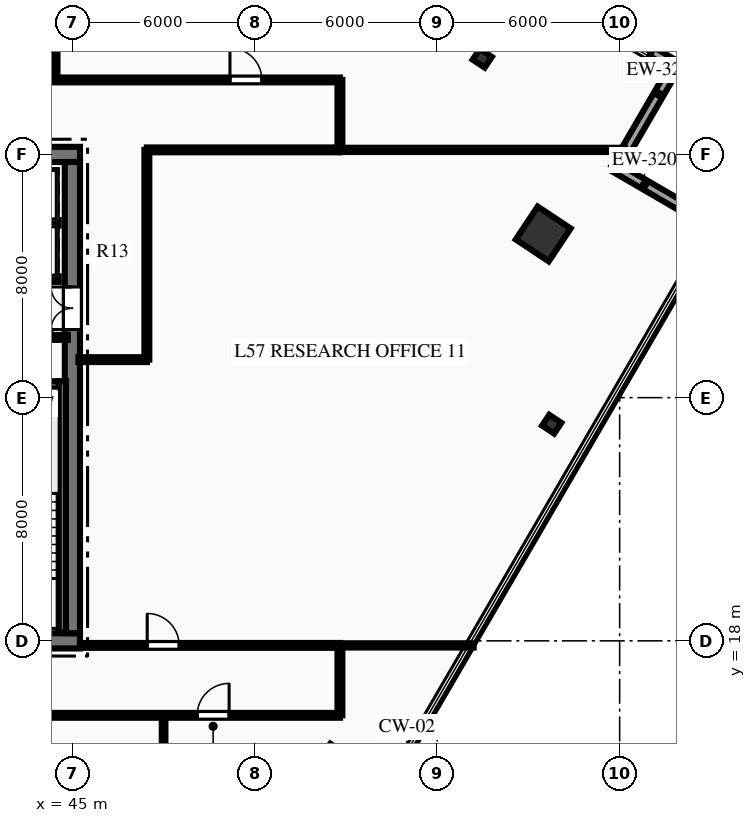
"""IFC4 building model, lengths in metres.
Left out: names, types, materials, properties, quantities, classifications, styles, units other than length and angle.
Written with IfcOpenShell. Run it as: python <this file> out.ifc"""

import sys

from ifc_helpers import new_model, si_unit, direction, frame, frame_2d, origin, origin_2d, place, context, subcontext, project, spatial, rectangle, hollow_rectangle, i_section, extrude, element, fill, save


model = new_model("IFC4")
c1 = context("Model", 3, precision=1e-05, world=origin(), true_north=direction((0.0, 1.0)))
c2 = subcontext(c1, "Body", "Model", "MODEL_VIEW")
j1 = project(units=[si_unit("LENGTHUNIT", "METRE"), si_unit("PLANEANGLEUNIT", "RADIAN")], contexts=[c1])
p1 = place(None, origin())
s1 = spatial("IfcSite", under=j1, at=p1, CompositionType="ELEMENT")
p2 = place(p1, origin())
s2 = spatial("IfcBuilding", under=s1, at=p2, CompositionType="ELEMENT")
p3 = place(p2, frame((0.0, 0.0, 228.45)))
s3 = spatial("IfcBuildingStorey", under=s2, at=p3, CompositionType="ELEMENT", Elevation=228.45)
p4 = place(p3, frame((26.75, 18.0, 0.0), z_axis=(0.0, 0.0, 1.0), x_axis=(1.0, 0.0, 0.0)))
e1 = element("IfcWall", 1, at=p4, inside=s3, PredefinedType="SHEAR", context=c2, shape_type="SweptSolid", body=[
    extrude(rectangle(XDim=18.5, YDim=0.5, at=frame_2d((9.25, 0.0))), origin(), (0.0, 0.0, 1.0), 3.75),
])
p5 = place(p4, frame((7.35, 0.0, 0.0)))
e2 = element("IfcOpeningElement", 2, at=p5, cuts=e1, PredefinedType="OPENING", context=c2, shape_type="SweptSolid", body=[
    extrude(rectangle(XDim=1.1, YDim=2.15, at=frame_2d((0.55, 1.075))), frame((0.0, 0.26, 0.0), z_axis=(0.0, -1.0, 0.0), x_axis=(1.0, 0.0, 0.0)), (0.0, 0.0, 1.0), 0.52),
])
p6 = place(p4, frame((10.05, 0.0, 0.0)))
e3 = element("IfcOpeningElement", 3, at=p6, cuts=e1, PredefinedType="OPENING", context=c2, shape_type="SweptSolid", body=[
    extrude(rectangle(XDim=1.1, YDim=2.15, at=frame_2d((0.55, 1.075))), frame((0.0, 0.26, 0.0), z_axis=(0.0, -1.0, 0.0), x_axis=(1.0, 0.0, 0.0)), (0.0, 0.0, 1.0), 0.52),
])
p7 = place(p3, frame((26.75, 34.0, 0.0), z_axis=(0.0, 0.0, 1.0), x_axis=(1.0, 0.0, 0.0)))
e4 = element("IfcWall", 4, at=p7, inside=s3, PredefinedType="SHEAR", context=c2, shape_type="SweptSolid", body=[
    extrude(rectangle(XDim=18.5, YDim=0.5, at=frame_2d((9.25, 0.0))), origin(), (0.0, 0.0, 1.0), 3.75),
])
p8 = place(p7, frame((13.935, 0.0, 0.0)))
e5 = element("IfcOpeningElement", 5, at=p8, cuts=e4, PredefinedType="OPENING", context=c2, shape_type="SweptSolid", body=[
    extrude(rectangle(XDim=1.1, YDim=2.15, at=frame_2d((0.55, 1.075))), frame((0.0, 0.26, 0.0), z_axis=(0.0, -1.0, 0.0), x_axis=(1.0, 0.0, 0.0)), (0.0, 0.0, 1.0), 0.52),
])
p9 = place(p7, frame((16.185, 0.0, 0.0)))
e6 = element("IfcOpeningElement", 6, at=p9, cuts=e4, PredefinedType="OPENING", context=c2, shape_type="SweptSolid", body=[
    extrude(rectangle(XDim=1.1, YDim=2.15, at=frame_2d((0.55, 1.075))), frame((0.0, 0.26, 0.0), z_axis=(0.0, -1.0, 0.0), x_axis=(1.0, 0.0, 0.0)), (0.0, 0.0, 1.0), 0.52),
])
p10 = place(p3, frame((45.0, 18.25, 0.0), z_axis=(0.0, 0.0, 1.0), x_axis=(0.0, 1.0, 0.0)))
e7 = element("IfcWall", 7, at=p10, inside=s3, PredefinedType="SHEAR", context=c2, shape_type="SweptSolid", body=[
    extrude(rectangle(XDim=15.5, YDim=0.5, at=frame_2d((7.75, 0.0))), origin(), (0.0, 0.0, 1.0), 3.75),
])
p11 = place(p10, frame((9.99, 0.0, 0.0)))
e8 = element("IfcOpeningElement", 8, at=p11, cuts=e7, PredefinedType="OPENING", context=c2, shape_type="SweptSolid", body=[
    extrude(rectangle(XDim=1.4, YDim=2.2, at=frame_2d((0.7, 1.1))), frame((0.0, 0.26, 0.0), z_axis=(0.0, -1.0, 0.0), x_axis=(1.0, 0.0, 0.0)), (0.0, 0.0, 1.0), 0.52),
])
p12 = place(p3, frame((40.81, 26.42, 0.0), z_axis=(0.0, 0.0, 1.0), x_axis=(1.0, 0.0, 0.0)))
e9 = element("IfcWall", 9, at=p12, inside=s3, PredefinedType="SHEAR", context=c2, shape_type="SweptSolid", body=[
    extrude(rectangle(XDim=3.98, YDim=0.24, at=frame_2d((1.99, 0.0))), origin(), (0.0, 0.0, 1.0), 3.75),
])
p13 = place(p3, frame((44.67, 18.28, 0.0), z_axis=(0.0, 0.0, 1.0), x_axis=(0.0, 1.0, 0.0)))
e10 = element("IfcWall", 10, at=p13, inside=s3, PredefinedType="SHEAR", context=c2, shape_type="SweptSolid", body=[
    extrude(rectangle(XDim=8.26, YDim=0.24, at=frame_2d((4.13, 0.0))), origin(), (0.0, 0.0, 1.0), 3.75),
])
p14 = place(p3, frame((60.486, 31.384, 0.0), z_axis=(0.0, 0.0, 1.0), x_axis=(0.554118199338, 0.832437998389, 0.0)))
e11 = element("IfcColumn", 11, at=p14, inside=s3, PredefinedType="COLUMN", context=c2, shape_type="SweptSolid", body=[
    extrude(hollow_rectangle(XDim=1.3, YDim=1.3, WallThickness=0.06, at=origin_2d()), origin(), (0.0, 0.0, 1.0), 3.75),
])
for number, where, z_axis, x_axis in (
    (12, (60.766, 25.126, 0.0), (0.0, 0.0, 1.0), (0.554, 0.832, 0.0)),
    (13, (58.481, 37.164, 0.0), (0.0, 0.0, 1.0), (0.554, 0.832, 0.0)),
):
    element("IfcColumn", number, at=place(p3, frame(where, z_axis=z_axis, x_axis=x_axis)), inside=s3, PredefinedType="COLUMN", context=c2, shape_type="SweptSolid", body=[
        extrude(i_section(OverallWidth=0.424, OverallDepth=0.474, WebThickness=0.048, FlangeThickness=0.077, at=origin_2d()), origin(), (0.0, 0.0, 1.0), 3.75),
    ])
p15 = place(p3, frame((62.874, 33.558, 0.0), z_axis=(0.0, 0.0, 1.0), x_axis=(0.86427115238, -0.503026217174, 0.0)))
e14 = element("IfcWall", 14, at=p15, inside=s3, PredefinedType="STANDARD", context=c2, shape_type="SweptSolid", body=[
    extrude(rectangle(XDim=3.9, YDim=0.32, at=frame_2d((1.95, 0.0))), origin(), (0.0, 0.0, 1.0), 3.47),
])
p16 = place(p3, frame((64.836, 36.928, 0.0), z_axis=(0.0, 0.0, 1.0), x_axis=(-0.503053432331, -0.864255311942, 0.0)))
e15 = element("IfcWall", 15, at=p16, inside=s3, PredefinedType="STANDARD", context=c2, shape_type="SweptSolid", body=[
    extrude(rectangle(XDim=3.9, YDim=0.32, at=frame_2d((1.95, 0.0))), origin(), (0.0, 0.0, 1.0), 3.47),
])
p17 = place(p3, frame((64.058, 37.381, 0.0), z_axis=(0.0, 0.0, 1.0), x_axis=(0.86430974307, -0.502959906984, 0.0)))
e16 = element("IfcWall", 16, at=p17, inside=s3, PredefinedType="STANDARD", context=c2, shape_type="SweptSolid", body=[
    extrude(rectangle(XDim=0.9, YDim=0.32, at=frame_2d((0.45, 0.0))), origin(), (0.0, 0.0, 1.0), 3.47),
])
p18 = place(p3, frame((40.8, 27.98, 0.0), z_axis=(0.0, 0.0, 1.0), x_axis=(1.0, 0.0, 0.0)))
e17 = element("IfcWall", 17, at=p18, inside=s3, PredefinedType="PARTITIONING", context=c2, shape_type="SweptSolid", body=[
    extrude(rectangle(XDim=4.05, YDim=0.16, at=frame_2d((2.025, 0.0))), origin(), (0.0, 0.0, 1.0), 3.47),
])
p19 = place(p18, frame((0.77, 0.0, 0.0)))
e18 = element("IfcOpeningElement", 18, at=p19, cuts=e17, PredefinedType="OPENING", context=c2, shape_type="SweptSolid", body=[
    extrude(rectangle(XDim=0.9, YDim=2.15, at=frame_2d((0.45, 1.075))), frame((0.0, 0.09, 0.0), z_axis=(0.0, -1.0, 0.0), x_axis=(1.0, 0.0, 0.0)), (0.0, 0.0, 1.0), 0.18),
])
p20 = place(p18, frame((2.68, 0.0, 0.0)))
e19 = element("IfcOpeningElement", 19, at=p20, cuts=e17, PredefinedType="OPENING", context=c2, shape_type="SweptSolid", body=[
    extrude(rectangle(XDim=0.9, YDim=2.15, at=frame_2d((0.45, 1.075))), frame((0.0, 0.09, 0.0), z_axis=(0.0, -1.0, 0.0), x_axis=(1.0, 0.0, 0.0)), (0.0, 0.0, 1.0), 0.18),
])
p21 = place(p3, frame((40.12, 29.9, 0.0), z_axis=(0.0, 0.0, 1.0), x_axis=(1.0, 0.0, 0.0)))
e20 = element("IfcWall", 20, at=p21, inside=s3, PredefinedType="PARTITIONING", context=c2, shape_type="SweptSolid", body=[
    extrude(rectangle(XDim=4.43, YDim=0.18, at=frame_2d((2.215, 0.0))), origin(), (0.0, 0.0, 1.0), 3.47),
])
p22 = place(p21, frame((0.565, 0.0, 0.0)))
e21 = element("IfcOpeningElement", 21, at=p22, cuts=e20, PredefinedType="OPENING", context=c2, shape_type="SweptSolid", body=[
    extrude(rectangle(XDim=1.1, YDim=2.15, at=frame_2d((0.55, 1.075))), frame((0.0, 0.1, 0.0), z_axis=(0.0, -1.0, 0.0), x_axis=(1.0, 0.0, 0.0)), (0.0, 0.0, 1.0), 0.2),
])
p23 = place(p21, frame((2.815, 0.0, 0.0)))
e22 = element("IfcOpeningElement", 22, at=p23, cuts=e20, PredefinedType="OPENING", context=c2, shape_type="SweptSolid", body=[
    extrude(rectangle(XDim=1.1, YDim=2.15, at=frame_2d((0.55, 1.075))), frame((0.0, 0.1, 0.0), z_axis=(0.0, -1.0, 0.0), x_axis=(1.0, 0.0, 0.0)), (0.0, 0.0, 1.0), 0.2),
])
p24 = place(p3, frame((40.12, 31.75, 0.0), z_axis=(0.0, 0.0, 1.0), x_axis=(1.0, 0.0, 0.0)))
e23 = element("IfcWall", 23, at=p24, inside=s3, PredefinedType="PARTITIONING", context=c2, shape_type="SweptSolid", body=[
    extrude(rectangle(XDim=4.43, YDim=0.18, at=frame_2d((2.215, 0.0))), origin(), (0.0, 0.0, 1.0), 3.47),
])
p25 = place(p3, frame((18.2, 15.55, 0.0), z_axis=(0.0, 0.0, 1.0), x_axis=(1.0, 0.0, 0.0)))
e24 = element("IfcWall", 24, at=p25, inside=s3, PredefinedType="PARTITIONING", context=c2, shape_type="SweptSolid", body=[
    extrude(rectangle(XDim=35.6, YDim=0.16, at=frame_2d((17.8, 0.0))), origin(), (0.0, 0.0, 1.0), 3.008),
])
p26 = place(p25, frame((3.587, 0.0, 0.0)))
e25 = element("IfcOpeningElement", 25, at=p26, cuts=e24, PredefinedType="OPENING", context=c2, shape_type="SweptSolid", body=[
    extrude(rectangle(XDim=1.05, YDim=2.15, at=frame_2d((0.525, 1.075))), frame((0.0, 0.09, 0.0), z_axis=(0.0, -1.0, 0.0), x_axis=(1.0, 0.0, 0.0)), (0.0, 0.0, 1.0), 0.18),
])
p27 = place(p25, frame((16.775, 0.0, 0.0)))
e26 = element("IfcOpeningElement", 26, at=p27, cuts=e24, PredefinedType="OPENING", context=c2, shape_type="SweptSolid", body=[
    extrude(rectangle(XDim=1.05, YDim=2.15, at=frame_2d((0.525, 1.075))), frame((0.0, 0.09, 0.0), z_axis=(0.0, -1.0, 0.0), x_axis=(1.0, 0.0, 0.0)), (0.0, 0.0, 1.0), 0.18),
])
p28 = place(p25, frame((24.055, 0.0, 0.0)))
e27 = element("IfcOpeningElement", 27, at=p28, cuts=e24, PredefinedType="OPENING", context=c2, shape_type="SweptSolid", body=[
    extrude(rectangle(XDim=1.05, YDim=2.15, at=frame_2d((0.525, 1.075))), frame((0.0, 0.09, 0.0), z_axis=(0.0, -1.0, 0.0), x_axis=(1.0, 0.0, 0.0)), (0.0, 0.0, 1.0), 0.18),
])
p29 = place(p25, frame((30.905, 0.0, 0.0)))
e28 = element("IfcOpeningElement", 28, at=p29, cuts=e24, PredefinedType="OPENING", context=c2, shape_type="SweptSolid", body=[
    extrude(rectangle(XDim=1.05, YDim=2.15, at=frame_2d((0.525, 1.075))), frame((0.0, 0.09, 0.0), z_axis=(0.0, -1.0, 0.0), x_axis=(1.0, 0.0, 0.0)), (0.0, 0.0, 1.0), 0.18),
])
p30 = place(p3, frame((45.25, 17.85, 0.0), z_axis=(0.0, 0.0, 1.0), x_axis=(1.0, 0.0, 0.0)))
e29 = element("IfcWall", 29, at=p30, inside=s3, PredefinedType="PARTITIONING", context=c2, shape_type="SweptSolid", body=[
    extrude(rectangle(XDim=8.55, YDim=0.16, at=frame_2d((4.275, 0.0))), origin(), (0.0, 0.0, 1.0), 3.47),
])
p31 = place(p30, frame((2.211, 0.0, 0.0)))
e30 = element("IfcOpeningElement", 30, at=p31, cuts=e29, PredefinedType="OPENING", context=c2, shape_type="SweptSolid", body=[
    extrude(rectangle(XDim=1.05, YDim=2.15, at=frame_2d((0.525, 1.075))), frame((0.0, 0.09, 0.0), z_axis=(0.0, -1.0, 0.0), x_axis=(1.0, 0.0, 0.0)), (0.0, 0.0, 1.0), 0.18),
])
p32 = place(p3, frame((18.2, 36.45, 0.0), z_axis=(0.0, 0.0, 1.0), x_axis=(1.0, 0.0, 0.0)))
e31 = element("IfcWall", 31, at=p32, inside=s3, PredefinedType="PARTITIONING", context=c2, shape_type="SweptSolid", body=[
    extrude(rectangle(XDim=35.6, YDim=0.16, at=frame_2d((17.8, 0.0))), origin(), (0.0, 0.0, 1.0), 2.849),
])
p33 = place(p32, frame((20.05, 0.0, 0.0)))
e32 = element("IfcOpeningElement", 32, at=p33, cuts=e31, PredefinedType="OPENING", context=c2, shape_type="SweptSolid", body=[
    extrude(rectangle(XDim=0.9, YDim=2.15, at=frame_2d((0.45, 1.075))), frame((0.0, 0.09, 0.0), z_axis=(0.0, -1.0, 0.0), x_axis=(1.0, 0.0, 0.0)), (0.0, 0.0, 1.0), 0.18),
])
p34 = place(p32, frame((22.35, 0.0, 0.0)))
e33 = element("IfcOpeningElement", 33, at=p34, cuts=e31, PredefinedType="OPENING", context=c2, shape_type="SweptSolid", body=[
    extrude(rectangle(XDim=0.9, YDim=2.15, at=frame_2d((0.45, 1.075))), frame((0.0, 0.09, 0.0), z_axis=(0.0, -1.0, 0.0), x_axis=(1.0, 0.0, 0.0)), (0.0, 0.0, 1.0), 0.18),
])
p35 = place(p32, frame((24.6, 0.0, 0.0)))
e34 = element("IfcOpeningElement", 34, at=p35, cuts=e31, PredefinedType="OPENING", context=c2, shape_type="SweptSolid", body=[
    extrude(rectangle(XDim=1.0, YDim=2.15, at=frame_2d((0.5, 1.075))), frame((0.0, 0.09, 0.0), z_axis=(0.0, -1.0, 0.0), x_axis=(1.0, 0.0, 0.0)), (0.0, 0.0, 1.0), 0.18),
])
p36 = place(p32, frame((4.325, 0.0, 0.0)))
e35 = element("IfcOpeningElement", 35, at=p36, cuts=e31, PredefinedType="OPENING", context=c2, shape_type="SweptSolid", body=[
    extrude(rectangle(XDim=1.05, YDim=2.15, at=frame_2d((0.525, 1.075))), frame((0.0, 0.09, 0.0), z_axis=(0.0, -1.0, 0.0), x_axis=(1.0, 0.0, 0.0)), (0.0, 0.0, 1.0), 0.18),
])
p37 = place(p32, frame((11.155, 0.0, 0.0)))
e36 = element("IfcOpeningElement", 36, at=p37, cuts=e31, PredefinedType="OPENING", context=c2, shape_type="SweptSolid", body=[
    extrude(rectangle(XDim=1.05, YDim=2.15, at=frame_2d((0.525, 1.075))), frame((0.0, 0.09, 0.0), z_axis=(0.0, -1.0, 0.0), x_axis=(1.0, 0.0, 0.0)), (0.0, 0.0, 1.0), 0.18),
])
p38 = place(p32, frame((31.983, 0.0, 0.0)))
e37 = element("IfcOpeningElement", 37, at=p38, cuts=e31, PredefinedType="OPENING", context=c2, shape_type="SweptSolid", body=[
    extrude(rectangle(XDim=1.05, YDim=2.15, at=frame_2d((0.525, 1.075))), frame((0.0, 0.09, 0.0), z_axis=(0.0, -1.0, 0.0), x_axis=(1.0, 0.0, 0.0)), (0.0, 0.0, 1.0), 0.18),
])
p39 = place(p3, frame((47.45, 34.15, 0.0), z_axis=(0.0, 0.0, 1.0), x_axis=(1.0, 0.0, 0.0)))
e38 = element("IfcWall", 38, at=p39, inside=s3, PredefinedType="PARTITIONING", context=c2, shape_type="SweptSolid", body=[
    extrude(rectangle(XDim=6.35, YDim=0.16, at=frame_2d((3.175, 0.0))), origin(), (0.0, 0.0, 1.0), 3.47),
])
p40 = place(p3, frame((47.45, 27.25, 0.0), z_axis=(0.0, 0.0, 1.0), x_axis=(0.0, 1.0, 0.0)))
e39 = element("IfcWall", 39, at=p40, inside=s3, PredefinedType="PARTITIONING", context=c2, shape_type="SweptSolid", body=[
    extrude(rectangle(XDim=6.9, YDim=0.16, at=frame_2d((3.45, 0.0))), origin(), (0.0, 0.0, 1.0), 3.47),
])
p41 = place(p3, frame((45.2, 27.25, 0.0), z_axis=(0.0, 0.0, 1.0), x_axis=(1.0, 0.0, 0.0)))
e40 = element("IfcWall", 40, at=p41, inside=s3, PredefinedType="PARTITIONING", context=c2, shape_type="SweptSolid", body=[
    extrude(rectangle(XDim=2.25, YDim=0.16, at=frame_2d((1.125, 0.0))), origin(), (0.0, 0.0, 1.0), 3.47),
])
for number, where, z_axis, x_axis in (
    (41, (53.8, 15.55, 0.0), (0.0, 0.0, 1.0), (0.0, 1.0, 0.0)),
    (42, (53.8, 34.15, 0.0), (0.0, 0.0, 1.0), (0.0, 1.0, 0.0)),
):
    element("IfcWall", number, at=place(p3, frame(where, z_axis=z_axis, x_axis=x_axis)), inside=s3, PredefinedType="PARTITIONING", context=c2, shape_type="SweptSolid", body=[
        extrude(rectangle(XDim=2.3, YDim=0.16, at=frame_2d((1.15, 0.0))), origin(), (0.0, 0.0, 1.0), 3.47),
    ])
p42 = place(p3, frame((44.45, 36.45, 0.0), z_axis=(0.0, 0.0, 1.0), x_axis=(0.0, 1.0, 0.0)))
e43 = element("IfcWall", 43, at=p42, inside=s3, PredefinedType="PARTITIONING", context=c2, shape_type="SweptSolid", body=[
    extrude(rectangle(XDim=3.9, YDim=0.12, at=frame_2d((1.95, 0.0))), origin(), (0.0, 0.0, 1.0), 3.47),
])
p43 = place(p3, frame((53.8, 17.85, 0.0), z_axis=(0.0, 0.0, 1.0), x_axis=(1.0, 0.0, 0.0)))
e44 = element("IfcWall", 44, at=p43, inside=s3, PredefinedType="PARTITIONING", context=c2, shape_type="SweptSolid", body=[
    extrude(rectangle(XDim=4.398, YDim=0.14, at=frame_2d((2.199, 0.0))), origin(), (0.0, 0.0, 1.0), 3.47),
])
p44 = place(p3, frame((53.8, 34.15, 0.0), z_axis=(0.0, 0.0, 1.0), x_axis=(1.0, 0.0, 0.0)))
e45 = element("IfcWall", 45, at=p44, inside=s3, PredefinedType="PARTITIONING", context=c2, shape_type="SweptSolid", body=[
    extrude(rectangle(XDim=9.373, YDim=0.14, at=frame_2d((4.686, 0.0))), origin(), (0.0, 0.0, 1.0), 3.47),
])
p45 = place(p3, frame((48.0, 0.327, 0.0), z_axis=(0.0, 0.0, 1.0), x_axis=(0.0, 1.0, 0.0)))
e46 = element("IfcWall", 46, at=p45, inside=s3, PredefinedType="PARTITIONING", context=c2, shape_type="SweptSolid", body=[
    extrude(rectangle(XDim=15.223, YDim=0.12, at=frame_2d((7.611, 0.0))), origin(), (0.0, 0.0, 1.0), 3.47),
])
p46 = place(p20, origin())
e47 = element("IfcDoor", 47, at=p46, inside=s3, OperationType="SINGLE_SWING_LEFT", PredefinedType="DOOR", context=c2, shape_type="SweptSolid", body=[
    extrude(rectangle(XDim=0.9, YDim=2.15, at=frame_2d((0.45, 1.075))), frame((0.0, 0.025, 0.0), z_axis=(0.0, -1.0, 0.0), x_axis=(1.0, 0.0, 0.0)), (0.0, 0.0, 1.0), 0.05),
])
fill(e19, e47)
p47 = place(p11, origin())
e48 = element("IfcDoor", 48, at=p47, inside=s3, OperationType="DOUBLE_DOOR_SINGLE_SWING", PredefinedType="DOOR", context=c2, shape_type="SweptSolid", body=[
    extrude(rectangle(XDim=1.4, YDim=2.2, at=frame_2d((0.7, 1.1))), frame((0.0, 0.025, 0.0), z_axis=(0.0, -1.0, 0.0), x_axis=(1.0, 0.0, 0.0)), (0.0, 0.0, 1.0), 0.05),
])
fill(e8, e48)
p48 = place(p29, origin())
e49 = element("IfcDoor", 49, at=p48, inside=s3, OperationType="SINGLE_SWING_RIGHT", PredefinedType="DOOR", context=c2, shape_type="SweptSolid", body=[
    extrude(rectangle(XDim=1.05, YDim=2.15, at=frame_2d((0.525, 1.075))), frame((0.0, 0.025, 0.0), z_axis=(0.0, -1.0, 0.0), x_axis=(1.0, 0.0, 0.0)), (0.0, 0.0, 1.0), 0.05),
])
fill(e28, e49)
p49 = place(p38, origin())
e50 = element("IfcDoor", 50, at=p49, inside=s3, OperationType="SINGLE_SWING_LEFT", PredefinedType="DOOR", context=c2, shape_type="SweptSolid", body=[
    extrude(rectangle(XDim=1.05, YDim=2.15, at=frame_2d((0.525, 1.075))), frame((0.0, 0.025, 0.0), z_axis=(0.0, -1.0, 0.0), x_axis=(1.0, 0.0, 0.0)), (0.0, 0.0, 1.0), 0.05),
])
fill(e37, e50)
p50 = place(p31, origin())
e51 = element("IfcDoor", 51, at=p50, inside=s3, OperationType="SINGLE_SWING_LEFT", PredefinedType="DOOR", context=c2, shape_type="SweptSolid", body=[
    extrude(rectangle(XDim=1.05, YDim=2.15, at=frame_2d((0.525, 1.075))), frame((0.0, 0.025, 0.0), z_axis=(0.0, -1.0, 0.0), x_axis=(1.0, 0.0, 0.0)), (0.0, 0.0, 1.0), 0.05),
])
fill(e30, e51)
save(model, sys.argv[1])
